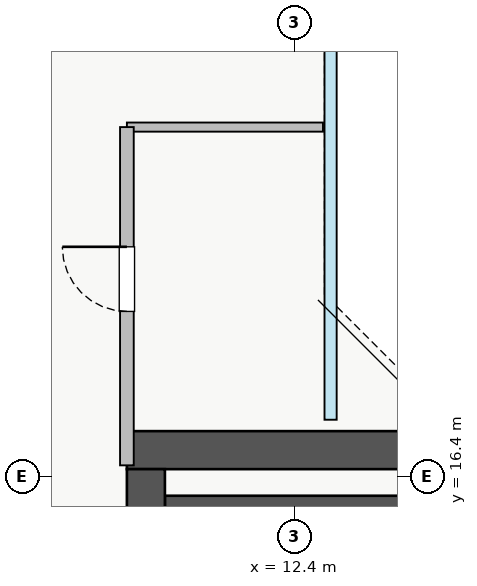
"""IFC4 building model, lengths in metres.
Left out: names, types, materials, properties, quantities, classifications, styles, units other than length and angle.
Written with IfcOpenShell. Run it as: python <this file> out.ifc"""

import sys

from ifc_helpers import new_model, si_unit, direction, frame, frame_2d, origin, place, context, subcontext, project, spatial, rectangle, extrude, source, transform, mapped, element, fill, save


model = new_model("IFC4")
c1 = context("Model", 3, precision=1e-05, world=origin(), true_north=direction((0.0, 1.0)))
c2 = subcontext(c1, "Body", "Model", "MODEL_VIEW")
j1 = project(units=[si_unit("LENGTHUNIT", "METRE"), si_unit("PLANEANGLEUNIT", "RADIAN")], contexts=[c1])
p1 = place(None, origin())
s1 = spatial("IfcSite", under=j1, at=p1, CompositionType="ELEMENT")
p2 = place(p1, origin())
s2 = spatial("IfcBuilding", under=s1, at=p2, CompositionType="ELEMENT")
p3 = place(p2, frame((0.0, 0.0, 216.5)))
s3 = spatial("IfcBuildingStorey", under=s2, at=p3, CompositionType="ELEMENT", Elevation=216.5)
p4 = place(p3, frame((10.7, 16.05, 0.0), z_axis=(0.0, 0.0, 1.0), x_axis=(1.0, 0.0, 0.0)))
e1 = element("IfcWall", 1, at=p4, inside=s3, PredefinedType="SHEAR", context=c2, shape_type="SweptSolid", body=[
    extrude(rectangle(XDim=7.45, YDim=0.2, at=frame_2d((3.725, 0.0))), origin(), (0.0, 0.0, 1.0), 3.25),
])
p5 = place(p3, frame((10.2, 16.75, 0.0), z_axis=(0.0, 0.0, 1.0), x_axis=(1.0, 0.0, 0.0)))
e2 = element("IfcWall", 2, at=p5, inside=s3, PredefinedType="SHEAR", context=c2, shape_type="SweptSolid", body=[
    extrude(rectangle(XDim=17.6, YDim=0.5, at=frame_2d((8.8, 0.0))), origin(), (0.0, 0.0, 1.0), 3.25),
])
p6 = place(p3, frame((10.45, 10.3, 0.0), z_axis=(0.0, 0.0, 1.0), x_axis=(0.0, 1.0, 0.0)))
e3 = element("IfcWall", 3, at=p6, inside=s3, PredefinedType="SHEAR", context=c2, shape_type="SweptSolid", body=[
    extrude(rectangle(XDim=6.2, YDim=0.5, at=frame_2d((3.1, 0.0))), origin(), (0.0, 0.0, 1.0), 3.25),
])
p7 = place(p3, frame((10.2, 21.0, 0.0), z_axis=(0.0, 0.0, 1.0), x_axis=(1.0, 0.0, 0.0)))
e4 = element("IfcWall", 4, at=p7, inside=s3, PredefinedType="PLUMBINGWALL", context=c2, shape_type="SweptSolid", body=[
    extrude(rectangle(XDim=2.58, YDim=0.12, at=frame_2d((1.29, 0.0))), origin(), (0.0, 0.0, 1.0), 3.07),
])
p8 = place(p3, frame((10.2, 16.55, 0.0), z_axis=(0.0, 0.0, 1.0), x_axis=(0.0, 1.0, 0.0)))
e5 = element("IfcWall", 5, at=p8, inside=s3, PredefinedType="PARTITIONING", context=c2, shape_type="SweptSolid", body=[
    extrude(rectangle(XDim=4.45, YDim=0.18, at=frame_2d((2.225, 0.0))), origin(), (0.0, 0.0, 1.0), 3.07),
])
p9 = place(p8, frame((2.025, 0.0, 0.0)))
e6 = element("IfcOpeningElement", 6, at=p9, cuts=e5, PredefinedType="OPENING", context=c2, shape_type="SweptSolid", body=[
    extrude(rectangle(XDim=0.85, YDim=2.05, at=frame_2d((0.425, 1.025))), frame((0.0, 0.1, 0.0), z_axis=(0.0, -1.0, 0.0), x_axis=(1.0, 0.0, 0.0)), (0.0, 0.0, 1.0), 0.2),
])
m1 = source(origin(), c2, "Body", "SweptSolid", [
    extrude(rectangle(XDim=0.85, YDim=2.05, at=frame_2d((0.425, 1.025))), frame((0.0, 0.025, 0.0), z_axis=(0.0, -1.0, 0.0), x_axis=(1.0, 0.0, 0.0)), (0.0, 0.0, 1.0), 0.05),
])
p10 = place(p9, origin())
e7 = element("IfcDoor", 7, at=p10, inside=s3, OperationType="SINGLE_SWING_RIGHT", PredefinedType="DOOR", context=c2, shape_type="MappedRepresentation", body=[
    mapped(m1, transform((0.0, 0.0, 0.0), x_axis=(1.0, 0.0, 0.0), y_axis=(0.0, 1.0, 0.0), z_axis=(0.0, 0.0, 1.0), scale=1.0)),
])
fill(e6, e7)
save(model, sys.argv[1])
